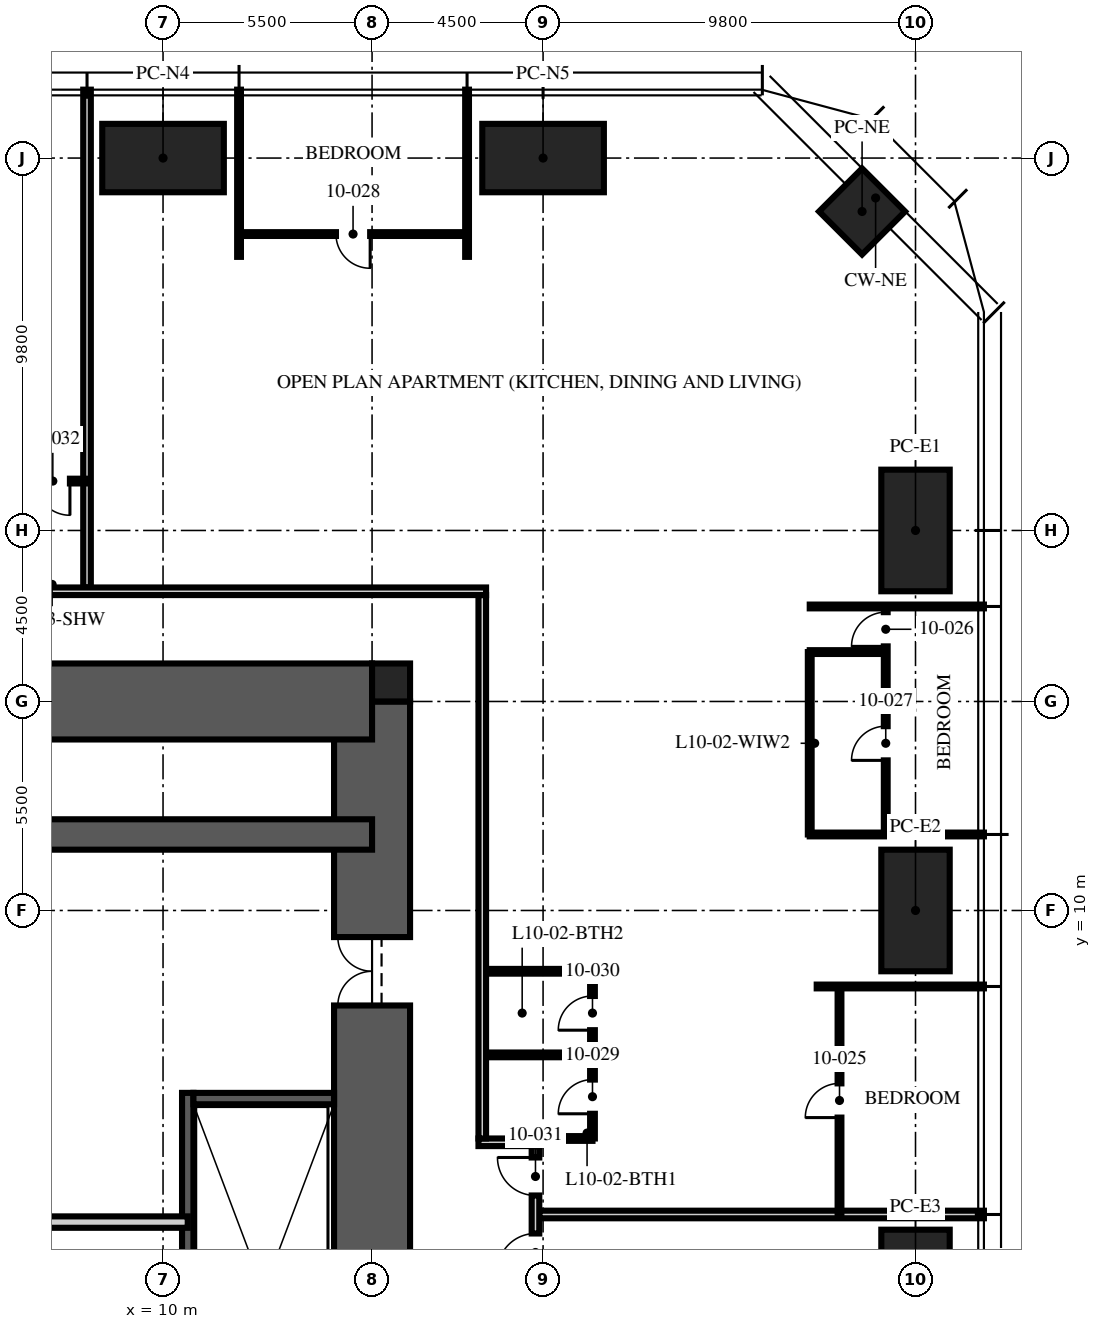
"""IFC4 building model, lengths in metres.
Left out: names, types, materials, properties, quantities, classifications, styles, units other than length and angle.
Written with IfcOpenShell. Run it as: python <this file> out.ifc"""

import sys

from ifc_helpers import new_model, si_unit, direction, frame, frame_2d, origin, origin_2d, place, context, subcontext, project, spatial, rectangle, hollow_rectangle, extrude, element, fill, save


model = new_model("IFC4")
c1 = context("Model", 3, precision=1e-05, world=origin(), true_north=direction((0.0, 1.0)))
c2 = subcontext(c1, "Body", "Model", "MODEL_VIEW")
j1 = project(units=[si_unit("LENGTHUNIT", "METRE"), si_unit("PLANEANGLEUNIT", "RADIAN")], contexts=[c1])
p1 = place(None, origin())
s1 = spatial("IfcSite", under=j1, at=p1, CompositionType="ELEMENT")
p2 = place(p1, origin())
s2 = spatial("IfcBuilding", under=s1, at=p2, CompositionType="ELEMENT")
p3 = place(p2, frame((0.0, 0.0, 43.5)))
s3 = spatial("IfcBuildingStorey", under=s2, at=p3, CompositionType="ELEMENT", Elevation=43.5)
p4 = place(p3, frame((15.5, -15.5, -0.25), z_axis=(0.0, 0.0, 1.0), x_axis=(0.0, 1.0, 0.0)))
e1 = element("IfcWall", 1, at=p4, inside=s3, PredefinedType="SHEAR", context=c2, shape_type="SweptSolid", body=[
    extrude(rectangle(XDim=31.0, YDim=2.0, at=frame_2d((15.5, 0.0))), origin(), (0.0, 0.0, 1.0), 3.75),
])
p5 = place(p4, frame((6.5, 0.0, 0.25)))
e2 = element("IfcOpeningElement", 2, at=p5, cuts=e1, PredefinedType="OPENING", context=c2, shape_type="SweptSolid", body=[
    extrude(rectangle(XDim=1.2, YDim=2.1, at=frame_2d((0.6, 1.05))), frame((0.0, 1.01, 0.0), z_axis=(0.0, -1.0, 0.0), x_axis=(1.0, 0.0, 0.0)), (0.0, 0.0, 1.0), 2.02),
])
p6 = place(p4, frame((23.0, 0.0, 0.25)))
e3 = element("IfcOpeningElement", 3, at=p6, cuts=e1, PredefinedType="OPENING", context=c2, shape_type="SweptSolid", body=[
    extrude(rectangle(XDim=1.8, YDim=2.1, at=frame_2d((0.9, 1.05))), frame((0.0, 1.01, 0.0), z_axis=(0.0, -1.0, 0.0), x_axis=(1.0, 0.0, 0.0)), (0.0, 0.0, 1.0), 2.02),
])
p7 = place(p3, frame((-15.5, 15.5, -0.25), z_axis=(0.0, 0.0, 1.0), x_axis=(1.0, 0.0, 0.0)))
e4 = element("IfcWall", 4, at=p7, inside=s3, PredefinedType="SHEAR", context=c2, shape_type="SweptSolid", body=[
    extrude(rectangle(XDim=31.0, YDim=2.0, at=frame_2d((15.5, 0.0))), origin(), (0.0, 0.0, 1.0), 3.75),
])
p8 = place(p7, frame((10.4, 0.0, 0.25)))
e5 = element("IfcOpeningElement", 5, at=p8, cuts=e4, PredefinedType="OPENING", context=c2, shape_type="SweptSolid", body=[
    extrude(rectangle(XDim=1.1, YDim=2.1, at=frame_2d((0.55, 1.05))), frame((0.0, 1.01, 0.0), z_axis=(0.0, -1.0, 0.0), x_axis=(1.0, 0.0, 0.0)), (0.0, 0.0, 1.0), 2.02),
])
p9 = place(p7, frame((13.5, 0.0, 0.25)))
e6 = element("IfcOpeningElement", 6, at=p9, cuts=e4, PredefinedType="OPENING", context=c2, shape_type="SweptSolid", body=[
    extrude(rectangle(XDim=1.1, YDim=2.1, at=frame_2d((0.55, 1.05))), frame((0.0, 1.01, 0.0), z_axis=(0.0, -1.0, 0.0), x_axis=(1.0, 0.0, 0.0)), (0.0, 0.0, 1.0), 2.02),
])
p10 = place(p7, frame((16.6, 0.0, 0.25)))
e7 = element("IfcOpeningElement", 7, at=p10, cuts=e4, PredefinedType="OPENING", context=c2, shape_type="SweptSolid", body=[
    extrude(rectangle(XDim=1.1, YDim=2.1, at=frame_2d((0.55, 1.05))), frame((0.0, 1.01, 0.0), z_axis=(0.0, -1.0, 0.0), x_axis=(1.0, 0.0, 0.0)), (0.0, 0.0, 1.0), 2.02),
])
p11 = place(p3, frame((-15.5, 12.0, -0.25), z_axis=(0.0, 0.0, 1.0), x_axis=(1.0, 0.0, 0.0)))
e8 = element("IfcWall", 8, at=p11, inside=s3, PredefinedType="SHEAR", context=c2, shape_type="SweptSolid", body=[
    extrude(rectangle(XDim=31.0, YDim=0.8, at=frame_2d((15.5, 0.0))), origin(), (0.0, 0.0, 1.0), 3.75),
])
p12 = place(p3, frame((16.0, 16.0, -0.25), z_axis=(0.0, 0.0, 1.0), x_axis=(1.0, 0.0, 0.0)))
e9 = element("IfcColumn", 9, at=p12, inside=s3, PredefinedType="COLUMN", context=c2, shape_type="SweptSolid", body=[
    extrude(rectangle(XDim=1.0, YDim=1.0, at=origin_2d()), origin(), (0.0, 0.0, 1.0), 3.75),
])
for number, where, z_axis, x_axis in (
    (10, (10.0, 29.8, 0.0), (0.0, 0.0, 1.0), (1.0, 0.0, 0.0)),
    (11, (20.0, 29.8, 0.0), (0.0, 0.0, 1.0), (1.0, 0.0, 0.0)),
    (12, (29.8, 20.0, 0.0), (0.0, 0.0, 1.0), (0.0, 1.0, 0.0)),
    (13, (29.8, 10.0, 0.0), (0.0, 0.0, 1.0), (0.0, 1.0, 0.0)),
    (14, (29.8, 0.0, 0.0), (0.0, 0.0, 1.0), (0.0, 1.0, 0.0)),
):
    element("IfcColumn", number, at=place(p3, frame(where, z_axis=z_axis, x_axis=x_axis)), inside=s3, PredefinedType="COLUMN", context=c2, shape_type="SweptSolid", body=[
        extrude(hollow_rectangle(XDim=3.2, YDim=1.8, WallThickness=0.2, at=origin_2d()), origin(), (0.0, 0.0, 1.0), 3.75),
    ])
p13 = place(p3, frame((28.394, 28.394, 0.0), z_axis=(0.0, 0.0, 1.0), x_axis=(0.707106781187, -0.707106781187, 0.0)))
e15 = element("IfcColumn", 15, at=p13, inside=s3, PredefinedType="COLUMN", context=c2, shape_type="SweptSolid", body=[
    extrude(hollow_rectangle(XDim=1.6, YDim=1.6, WallThickness=0.1, at=origin_2d()), origin(), (0.0, 0.0, 1.0), 3.75),
])
p14 = place(p3, frame((10.65, -4.9, 0.0), z_axis=(0.0, 0.0, 1.0), x_axis=(0.0, 1.0, 0.0)))
e16 = element("IfcWall", 16, at=p14, inside=s3, PredefinedType="SOLIDWALL", context=c2, shape_type="SweptSolid", body=[
    extrude(rectangle(XDim=10.1, YDim=0.3, at=frame_2d((5.05, 0.0))), origin(), (0.0, 0.0, 1.0), 3.5),
])
p15 = place(p3, frame((14.5, 5.05, 0.0), z_axis=(0.0, 0.0, 1.0), x_axis=(-1.0, 0.0, 0.0)))
e17 = element("IfcWall", 17, at=p15, inside=s3, PredefinedType="SOLIDWALL", context=c2, shape_type="SweptSolid", body=[
    extrude(rectangle(XDim=3.7, YDim=0.3, at=frame_2d((1.85, 0.0))), origin(), (0.0, 0.0, 1.0), 3.5),
])
p16 = place(p3, frame((-10.65, 1.8, 0.0), z_axis=(0.0, 0.0, 1.0), x_axis=(1.0, 0.0, 0.0)))
e18 = element("IfcWall", 18, at=p16, inside=s3, PredefinedType="PARTITIONING", context=c2, shape_type="SweptSolid", body=[
    extrude(rectangle(XDim=21.3, YDim=0.3, at=frame_2d((10.65, 0.0))), origin(), (0.0, 0.0, 1.0), 3.5),
])
p17 = place(p16, frame((10.05, 0.0, 0.0)))
e19 = element("IfcOpeningElement", 19, at=p17, cuts=e18, PredefinedType="OPENING", context=c2, shape_type="SweptSolid", body=[
    extrude(rectangle(XDim=1.2, YDim=2.1, at=frame_2d((0.6, 1.05))), frame((0.0, 0.16, 0.0), z_axis=(0.0, -1.0, 0.0), x_axis=(1.0, 0.0, 0.0)), (0.0, 0.0, 1.0), 0.32),
])
p18 = place(p16, frame((0.938, 0.0, 0.0)))
e20 = element("IfcOpeningElement", 20, at=p18, cuts=e18, PredefinedType="OPENING", context=c2, shape_type="SweptSolid", body=[
    extrude(rectangle(XDim=0.9, YDim=2.1, at=frame_2d((0.45, 1.05))), frame((0.0, 0.16, 0.0), z_axis=(0.0, -1.0, 0.0), x_axis=(1.0, 0.0, 0.0)), (0.0, 0.0, 1.0), 0.32),
])
p19 = place(p3, frame((19.9, 2.0, 0.0), z_axis=(0.0, 0.0, 1.0), x_axis=(1.0, 0.0, 0.0)))
e21 = element("IfcWall", 21, at=p19, inside=s3, PredefinedType="PARTITIONING", context=c2, shape_type="SweptSolid", body=[
    extrude(rectangle(XDim=11.7, YDim=0.2, at=frame_2d((5.85, 0.0))), origin(), (0.0, 0.0, 1.0), 2.71),
])
p20 = place(p3, frame((27.2, 8.0, 0.0), z_axis=(0.0, 0.0, 1.0), x_axis=(1.0, 0.0, 0.0)))
e22 = element("IfcWall", 22, at=p20, inside=s3, PredefinedType="PARTITIONING", context=c2, shape_type="SweptSolid", body=[
    extrude(rectangle(XDim=4.4, YDim=0.1, at=frame_2d((2.2, 0.0))), origin(), (0.0, 0.0, 1.0), 2.71),
])
for number, where, z_axis, x_axis in (
    (23, (27.017, 12.0, 0.0), (0.0, 0.0, 1.0), (1.0, 0.0, 0.0)),
    (24, (27.017, 18.0, 0.0), (0.0, 0.0, 1.0), (1.0, 0.0, 0.0)),
):
    element("IfcWall", number, at=place(p3, frame(where, z_axis=z_axis, x_axis=x_axis)), inside=s3, PredefinedType="PARTITIONING", context=c2, shape_type="SweptSolid", body=[
        extrude(rectangle(XDim=4.583, YDim=0.1, at=frame_2d((2.292, 0.0))), origin(), (0.0, 0.0, 1.0), 2.71),
    ])
for number, where, z_axis, x_axis in (
    (25, (18.0, 27.2, 0.0), (0.0, 0.0, 1.0), (0.0, 1.0, 0.0)),
    (26, (12.0, 27.2, 0.0), (0.0, 0.0, 1.0), (0.0, 1.0, 0.0)),
):
    element("IfcWall", number, at=place(p3, frame(where, z_axis=z_axis, x_axis=x_axis)), inside=s3, PredefinedType="PARTITIONING", context=c2, shape_type="SweptSolid", body=[
        extrude(rectangle(XDim=4.4, YDim=0.1, at=frame_2d((2.2, 0.0))), origin(), (0.0, 0.0, 1.0), 2.71),
    ])
p21 = place(p3, frame((8.0, 18.5, 0.0), z_axis=(0.0, 0.0, 1.0), x_axis=(0.0, 1.0, 0.0)))
e27 = element("IfcWall", 27, at=p21, inside=s3, PredefinedType="PARTITIONING", context=c2, shape_type="SweptSolid", body=[
    extrude(rectangle(XDim=13.1, YDim=0.2, at=frame_2d((6.55, 0.0))), origin(), (0.0, 0.0, 1.0), 2.71),
])
p22 = place(p3, frame((27.8, 2.0, 0.0), z_axis=(0.0, 0.0, 1.0), x_axis=(0.0, 1.0, 0.0)))
e28 = element("IfcWall", 28, at=p22, inside=s3, PredefinedType="PARTITIONING", context=c2, shape_type="SweptSolid", body=[
    extrude(rectangle(XDim=6.0, YDim=0.1, at=frame_2d((3.0, 0.0))), origin(), (0.0, 0.0, 1.0), 2.61),
])
p23 = place(p22, frame((2.55, 0.0, 0.0)))
e29 = element("IfcOpeningElement", 29, at=p23, cuts=e28, PredefinedType="OPENING", context=c2, shape_type="SweptSolid", body=[
    extrude(rectangle(XDim=0.9, YDim=2.1, at=frame_2d((0.45, 1.05))), frame((0.0, 0.06, 0.0), z_axis=(0.0, -1.0, 0.0), x_axis=(1.0, 0.0, 0.0)), (0.0, 0.0, 1.0), 0.12),
])
p24 = place(p3, frame((29.017, 12.0, 0.0), z_axis=(0.0, 0.0, 1.0), x_axis=(0.0, 1.0, 0.0)))
e30 = element("IfcWall", 30, at=p24, inside=s3, PredefinedType="PARTITIONING", context=c2, shape_type="SweptSolid", body=[
    extrude(rectangle(XDim=6.0, YDim=0.1, at=frame_2d((3.0, 0.0))), origin(), (0.0, 0.0, 1.0), 2.61),
])
p25 = place(p24, frame((4.95, 0.0, 0.0)))
e31 = element("IfcOpeningElement", 31, at=p25, cuts=e30, PredefinedType="OPENING", context=c2, shape_type="SweptSolid", body=[
    extrude(rectangle(XDim=0.9, YDim=2.1, at=frame_2d((0.45, 1.05))), frame((0.0, 0.06, 0.0), z_axis=(0.0, -1.0, 0.0), x_axis=(1.0, 0.0, 0.0)), (0.0, 0.0, 1.0), 0.12),
])
p26 = place(p24, frame((1.95, 0.0, 0.0)))
e32 = element("IfcOpeningElement", 32, at=p26, cuts=e30, PredefinedType="OPENING", context=c2, shape_type="SweptSolid", body=[
    extrude(rectangle(XDim=0.9, YDim=2.1, at=frame_2d((0.45, 1.05))), frame((0.0, 0.06, 0.0), z_axis=(0.0, -1.0, 0.0), x_axis=(1.0, 0.0, 0.0)), (0.0, 0.0, 1.0), 0.12),
])
p27 = place(p3, frame((27.017, 16.8, 0.0), z_axis=(0.0, 0.0, 1.0), x_axis=(1.0, 0.0, 0.0)))
e33 = element("IfcWall", 33, at=p27, inside=s3, PredefinedType="PARTITIONING", context=c2, shape_type="SweptSolid", body=[
    extrude(rectangle(XDim=2.0, YDim=0.1, at=frame_2d((1.0, 0.0))), origin(), (0.0, 0.0, 1.0), 3.5),
])
p28 = place(p3, frame((27.017, 12.0, 0.0), z_axis=(0.0, 0.0, 1.0), x_axis=(0.0, 1.0, 0.0)))
e34 = element("IfcWall", 34, at=p28, inside=s3, PredefinedType="PARTITIONING", context=c2, shape_type="SweptSolid", body=[
    extrude(rectangle(XDim=4.8, YDim=0.1, at=frame_2d((2.4, 0.0))), origin(), (0.0, 0.0, 1.0), 2.61),
])
p29 = place(p3, frame((18.0, 27.8, 0.0), z_axis=(0.0, 0.0, 1.0), x_axis=(-1.0, 0.0, 0.0)))
e35 = element("IfcWall", 35, at=p29, inside=s3, PredefinedType="PARTITIONING", context=c2, shape_type="SweptSolid", body=[
    extrude(rectangle(XDim=6.0, YDim=0.1, at=frame_2d((3.0, 0.0))), origin(), (0.0, 0.0, 1.0), 2.61),
])
p30 = place(p29, frame((2.55, 0.0, 0.0)))
e36 = element("IfcOpeningElement", 36, at=p30, cuts=e35, PredefinedType="OPENING", context=c2, shape_type="SweptSolid", body=[
    extrude(rectangle(XDim=0.9, YDim=2.1, at=frame_2d((0.45, 1.05))), frame((0.0, 0.06, 0.0), z_axis=(0.0, -1.0, 0.0), x_axis=(1.0, 0.0, 0.0)), (0.0, 0.0, 1.0), 0.12),
])
p31 = place(p3, frame((21.3, 4.0, 0.0), z_axis=(0.0, 0.0, 1.0), x_axis=(0.0, 1.0, 0.0)))
e37 = element("IfcWall", 37, at=p31, inside=s3, PredefinedType="PARTITIONING", context=c2, shape_type="SweptSolid", body=[
    extrude(rectangle(XDim=4.4, YDim=0.125, at=frame_2d((2.2, 0.0))), origin(), (0.0, 0.0, 1.0), 2.61),
])
p32 = place(p31, frame((0.65, 0.0, 0.0)))
e38 = element("IfcOpeningElement", 38, at=p32, cuts=e37, PredefinedType="OPENING", context=c2, shape_type="SweptSolid", body=[
    extrude(rectangle(XDim=0.9, YDim=2.1, at=frame_2d((0.45, 1.05))), frame((0.0, 0.073, 0.0), z_axis=(0.0, -1.0, 0.0), x_axis=(1.0, 0.0, 0.0)), (0.0, 0.0, 1.0), 0.145),
])
p33 = place(p31, frame((2.85, 0.0, 0.0)))
e39 = element("IfcOpeningElement", 39, at=p33, cuts=e37, PredefinedType="OPENING", context=c2, shape_type="SweptSolid", body=[
    extrude(rectangle(XDim=0.9, YDim=2.1, at=frame_2d((0.45, 1.05))), frame((0.0, 0.073, 0.0), z_axis=(0.0, -1.0, 0.0), x_axis=(1.0, 0.0, 0.0)), (0.0, 0.0, 1.0), 0.145),
])
p34 = place(p3, frame((19.97, 4.0, 0.0), z_axis=(0.0, 0.0, 1.0), x_axis=(1.0, 0.0, 0.0)))
e40 = element("IfcWall", 40, at=p34, inside=s3, PredefinedType="PARTITIONING", context=c2, shape_type="SweptSolid", body=[
    extrude(rectangle(XDim=1.33, YDim=0.125, at=frame_2d((0.665, 0.0))), origin(), (0.0, 0.0, 1.0), 3.5),
])
for number, where, z_axis, x_axis in (
    (41, (18.5, 6.2, 0.0), (0.0, 0.0, 1.0), (1.0, 0.0, 0.0)),
    (42, (18.5, 8.4, 0.0), (0.0, 0.0, 1.0), (1.0, 0.0, 0.0)),
):
    element("IfcWall", number, at=place(p3, frame(where, z_axis=z_axis, x_axis=x_axis)), inside=s3, PredefinedType="PARTITIONING", context=c2, shape_type="SweptSolid", body=[
        extrude(rectangle(XDim=2.8, YDim=0.125, at=frame_2d((1.4, 0.0))), origin(), (0.0, 0.0, 1.0), 3.5),
    ])
p35 = place(p3, frame((8.0, 21.3, 0.0), z_axis=(0.0, 0.0, 1.0), x_axis=(-1.0, 0.0, 0.0)))
e43 = element("IfcWall", 43, at=p35, inside=s3, PredefinedType="PARTITIONING", context=c2, shape_type="SweptSolid", body=[
    extrude(rectangle(XDim=1.8, YDim=0.125, at=frame_2d((0.9, 0.0))), origin(), (0.0, 0.0, 1.0), 3.5),
])
p36 = place(p35, frame((0.45, 0.0, 0.0)))
e44 = element("IfcOpeningElement", 44, at=p36, cuts=e43, PredefinedType="OPENING", context=c2, shape_type="SweptSolid", body=[
    extrude(rectangle(XDim=0.9, YDim=2.1, at=frame_2d((0.45, 1.05))), frame((0.0, 0.073, 0.0), z_axis=(0.0, -1.0, 0.0), x_axis=(1.0, 0.0, 0.0)), (0.0, 0.0, 1.0), 0.145),
])
p37 = place(p3, frame((18.3, 3.9, 0.0), z_axis=(0.0, 0.0, 1.0), x_axis=(1.0, 0.0, 0.0)))
e45 = element("IfcWall", 45, at=p37, inside=s3, PredefinedType="PARTITIONING", context=c2, shape_type="SweptSolid", body=[
    extrude(rectangle(XDim=1.6, YDim=0.2, at=frame_2d((0.8, 0.0))), origin(), (0.0, 0.0, 1.0), 3.5),
])
p38 = place(p3, frame((19.8, 0.2, 0.0), z_axis=(0.0, 0.0, 1.0), x_axis=(0.0, 1.0, 0.0)))
e46 = element("IfcWall", 46, at=p38, inside=s3, PredefinedType="PARTITIONING", context=c2, shape_type="SweptSolid", body=[
    extrude(rectangle(XDim=3.6, YDim=0.2, at=frame_2d((1.8, 0.0))), origin(), (0.0, 0.0, 1.0), 3.5),
])
p39 = place(p38, frame((0.3, 0.0, 0.0)))
e47 = element("IfcOpeningElement", 47, at=p39, cuts=e46, PredefinedType="OPENING", context=c2, shape_type="SweptSolid", body=[
    extrude(rectangle(XDim=1.0, YDim=2.2, at=frame_2d((0.5, 1.1))), frame((0.0, 0.11, 0.0), z_axis=(0.0, -1.0, 0.0), x_axis=(1.0, 0.0, 0.0)), (0.0, 0.0, 1.0), 0.22),
])
p40 = place(p38, frame((2.3, 0.0, 0.0)))
e48 = element("IfcOpeningElement", 48, at=p40, cuts=e46, PredefinedType="OPENING", context=c2, shape_type="SweptSolid", body=[
    extrude(rectangle(XDim=1.0, YDim=2.2, at=frame_2d((0.5, 1.1))), frame((0.0, 0.11, 0.0), z_axis=(0.0, -1.0, 0.0), x_axis=(1.0, 0.0, 0.0)), (0.0, 0.0, 1.0), 0.22),
])
p41 = place(p3, frame((18.4, 4.0, 0.0), z_axis=(0.0, 0.0, 1.0), x_axis=(0.0, 1.0, 0.0)))
e49 = element("IfcWall", 49, at=p41, inside=s3, PredefinedType="PARTITIONING", context=c2, shape_type="SweptSolid", body=[
    extrude(rectangle(XDim=14.3, YDim=0.2, at=frame_2d((7.15, 0.0))), origin(), (0.0, 0.0, 1.0), 2.3),
])
p42 = place(p3, frame((4.0, 18.4, 0.0), z_axis=(0.0, 0.0, 1.0), x_axis=(1.0, 0.0, 0.0)))
e50 = element("IfcWall", 50, at=p42, inside=s3, PredefinedType="PARTITIONING", context=c2, shape_type="SweptSolid", body=[
    extrude(rectangle(XDim=14.5, YDim=0.2, at=frame_2d((7.25, 0.0))), origin(), (0.0, 0.0, 1.0), 2.3),
])
p43 = place(p6, origin())
e51 = element("IfcDoor", 51, at=p43, inside=s3, OperationType="DOUBLE_DOOR_SINGLE_SWING", PredefinedType="DOOR", context=c2, shape_type="SweptSolid", body=[
    extrude(rectangle(XDim=1.8, YDim=2.1, at=frame_2d((0.9, 1.05))), frame((0.0, 0.025, 0.0), z_axis=(0.0, -1.0, 0.0), x_axis=(1.0, 0.0, 0.0)), (0.0, 0.0, 1.0), 0.05),
])
fill(e3, e51)
p44 = place(p39, origin())
e52 = element("IfcDoor", 52, at=p44, inside=s3, OperationType="SINGLE_SWING_LEFT", PredefinedType="DOOR", context=c2, shape_type="SweptSolid", body=[
    extrude(rectangle(XDim=1.0, YDim=2.2, at=frame_2d((0.5, 1.1))), frame((0.0, 0.025, 0.0), z_axis=(0.0, -1.0, 0.0), x_axis=(1.0, 0.0, 0.0)), (0.0, 0.0, 1.0), 0.05),
])
fill(e47, e52)
p45 = place(p23, origin())
e53 = element("IfcDoor", 53, at=p45, inside=s3, OperationType="SINGLE_SWING_LEFT", PredefinedType="DOOR", context=c2, shape_type="SweptSolid", body=[
    extrude(rectangle(XDim=0.9, YDim=2.1, at=frame_2d((0.45, 1.05))), frame((0.0, 0.025, 0.0), z_axis=(0.0, -1.0, 0.0), x_axis=(1.0, 0.0, 0.0)), (0.0, 0.0, 1.0), 0.05),
])
fill(e29, e53)
p46 = place(p25, origin())
e54 = element("IfcDoor", 54, at=p46, inside=s3, OperationType="SINGLE_SWING_LEFT", PredefinedType="DOOR", context=c2, shape_type="SweptSolid", body=[
    extrude(rectangle(XDim=0.9, YDim=2.1, at=frame_2d((0.45, 1.05))), frame((0.0, 0.025, 0.0), z_axis=(0.0, -1.0, 0.0), x_axis=(1.0, 0.0, 0.0)), (0.0, 0.0, 1.0), 0.05),
])
fill(e31, e54)
p47 = place(p26, origin())
e55 = element("IfcDoor", 55, at=p47, inside=s3, OperationType="SINGLE_SWING_LEFT", PredefinedType="DOOR", context=c2, shape_type="SweptSolid", body=[
    extrude(rectangle(XDim=0.9, YDim=2.1, at=frame_2d((0.45, 1.05))), frame((0.0, 0.025, 0.0), z_axis=(0.0, -1.0, 0.0), x_axis=(1.0, 0.0, 0.0)), (0.0, 0.0, 1.0), 0.05),
])
fill(e32, e55)
p48 = place(p30, origin())
e56 = element("IfcDoor", 56, at=p48, inside=s3, OperationType="SINGLE_SWING_LEFT", PredefinedType="DOOR", context=c2, shape_type="SweptSolid", body=[
    extrude(rectangle(XDim=0.9, YDim=2.1, at=frame_2d((0.45, 1.05))), frame((0.0, 0.025, 0.0), z_axis=(0.0, -1.0, 0.0), x_axis=(1.0, 0.0, 0.0)), (0.0, 0.0, 1.0), 0.05),
])
fill(e36, e56)
p49 = place(p32, origin())
e57 = element("IfcDoor", 57, at=p49, inside=s3, OperationType="SINGLE_SWING_LEFT", PredefinedType="DOOR", context=c2, shape_type="SweptSolid", body=[
    extrude(rectangle(XDim=0.9, YDim=2.1, at=frame_2d((0.45, 1.05))), frame((0.0, 0.025, 0.0), z_axis=(0.0, -1.0, 0.0), x_axis=(1.0, 0.0, 0.0)), (0.0, 0.0, 1.0), 0.05),
])
fill(e38, e57)
p50 = place(p33, origin())
e58 = element("IfcDoor", 58, at=p50, inside=s3, OperationType="SINGLE_SWING_LEFT", PredefinedType="DOOR", context=c2, shape_type="SweptSolid", body=[
    extrude(rectangle(XDim=0.9, YDim=2.1, at=frame_2d((0.45, 1.05))), frame((0.0, 0.025, 0.0), z_axis=(0.0, -1.0, 0.0), x_axis=(1.0, 0.0, 0.0)), (0.0, 0.0, 1.0), 0.05),
])
fill(e39, e58)
p51 = place(p40, origin())
e59 = element("IfcDoor", 59, at=p51, inside=s3, OperationType="SINGLE_SWING_RIGHT", PredefinedType="DOOR", context=c2, shape_type="SweptSolid", body=[
    extrude(rectangle(XDim=1.0, YDim=2.2, at=frame_2d((0.5, 1.1))), frame((0.0, 0.025, 0.0), z_axis=(0.0, -1.0, 0.0), x_axis=(1.0, 0.0, 0.0)), (0.0, 0.0, 1.0), 0.05),
])
fill(e48, e59)
p52 = place(p36, origin())
e60 = element("IfcDoor", 60, at=p52, inside=s3, OperationType="SINGLE_SWING_LEFT", PredefinedType="DOOR", context=c2, shape_type="SweptSolid", body=[
    extrude(rectangle(XDim=0.9, YDim=2.1, at=frame_2d((0.45, 1.05))), frame((0.0, 0.025, 0.0), z_axis=(0.0, -1.0, 0.0), x_axis=(1.0, 0.0, 0.0)), (0.0, 0.0, 1.0), 0.05),
])
fill(e44, e60)
save(model, sys.argv[1])
